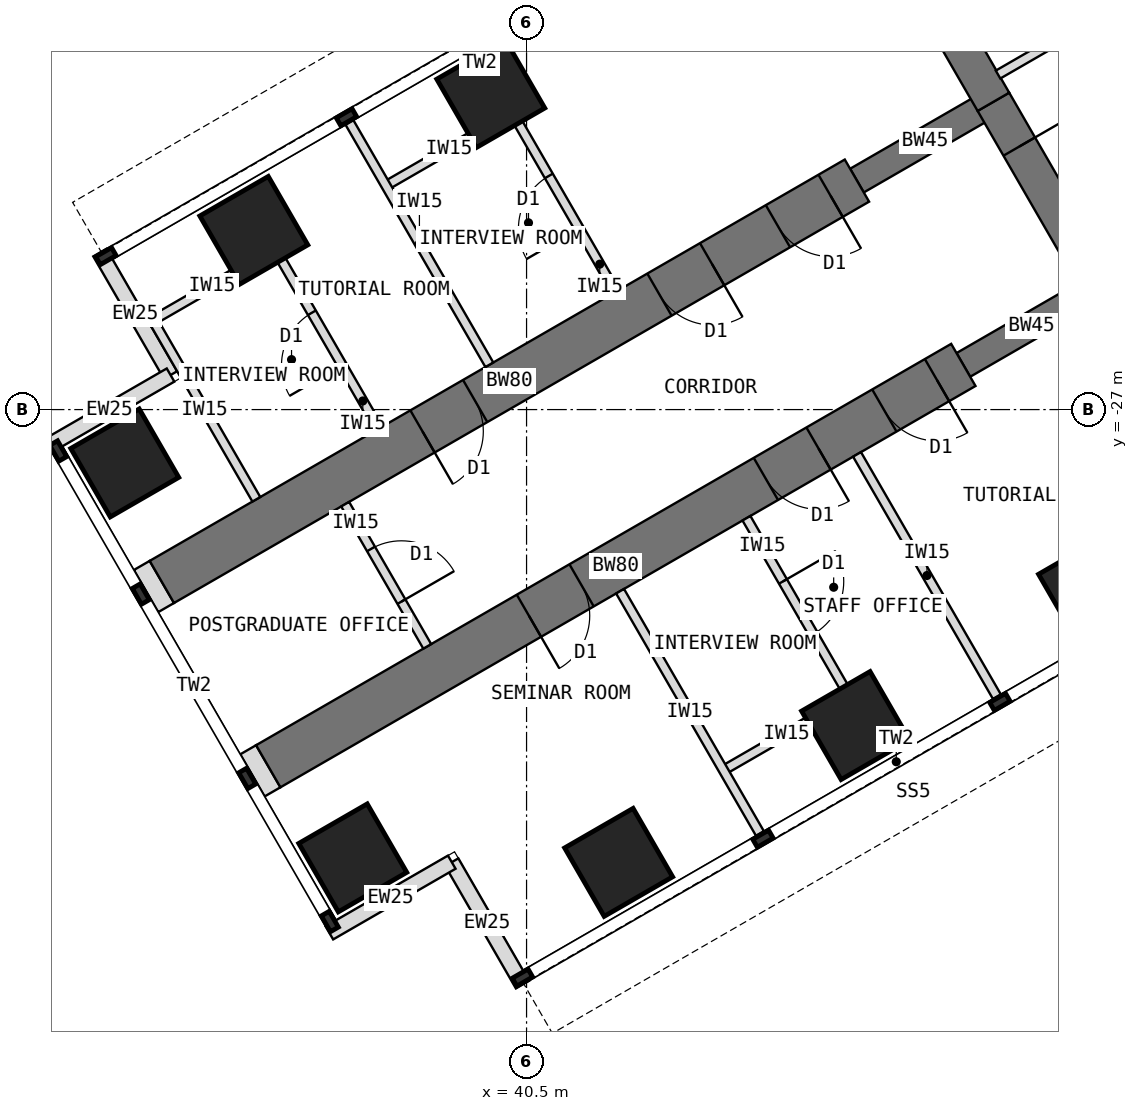
"""IFC4 building model, lengths in metres.
Left out: names, types, materials, properties, quantities, classifications, styles, units other than length and angle.
Written with IfcOpenShell. Run it as: python <this file> out.ifc"""

import sys

from ifc_helpers import new_model, si_unit, direction, frame, frame_2d, origin, origin_2d, place, context, subcontext, project, spatial, rectangle, extrude, element, fill, save


model = new_model("IFC4")
c1 = context("Model", 3, precision=1e-05, world=origin(), true_north=direction((0.0, 1.0)))
c2 = subcontext(c1, "Body", "Model", "MODEL_VIEW")
j1 = project(units=[si_unit("LENGTHUNIT", "METRE"), si_unit("PLANEANGLEUNIT", "RADIAN")], contexts=[c1])
p1 = place(None, origin())
s1 = spatial("IfcSite", under=j1, at=p1, CompositionType="ELEMENT")
p2 = place(p1, origin())
s2 = spatial("IfcBuilding", under=s1, at=p2, CompositionType="ELEMENT")
p3 = place(p2, frame((0.0, 0.0, 133.5)))
s3 = spatial("IfcBuildingStorey", under=s2, at=p3, CompositionType="ELEMENT", Elevation=133.5)
p4 = place(p3, frame((45.904, -18.0, 0.0), z_axis=(0.0, 0.0, 1.0), x_axis=(0.500024481964, -0.866011268655, 0.0)))
e1 = element("IfcWall", 1, at=p4, inside=s3, PredefinedType="SHEAR", context=c2, shape_type="SweptSolid", body=[
    extrude(rectangle(XDim=4.548, YDim=0.6, at=frame_2d((2.274, 0.0))), origin(), (0.0, 0.0, 1.0), 4.0),
])
p5 = place(p3, frame((48.178, -21.939, 0.0), z_axis=(0.0, 0.0, 1.0), x_axis=(0.500010275428, -0.866019471182, 0.0)))
e2 = element("IfcWall", 2, at=p5, inside=s3, PredefinedType="SHEAR", context=c2, shape_type="SweptSolid", body=[
    extrude(rectangle(XDim=3.5, YDim=0.6, at=frame_2d((1.75, 0.0))), origin(), (0.0, 0.0, 1.0), 4.0),
])
p6 = place(p5, frame((0.85, 0.0, 0.0)))
e3 = element("IfcOpeningElement", 3, at=p6, cuts=e2, PredefinedType="OPENING", context=c2, shape_type="SweptSolid", body=[
    extrude(rectangle(XDim=1.8, YDim=2.1, at=frame_2d((0.9, 1.05))), frame((0.0, 0.31, 0.0), z_axis=(0.0, -1.0, 0.0), x_axis=(1.0, 0.0, 0.0)), (0.0, 0.0, 1.0), 0.62),
])
p7 = place(p3, frame((49.928, -24.97, 0.0), z_axis=(0.0, 0.0, 1.0), x_axis=(-0.866031863473, -0.499988811324, 0.0)))
e4 = element("IfcWall", 4, at=p7, inside=s3, PredefinedType="SHEAR", context=c2, shape_type="SweptSolid", body=[
    extrude(rectangle(XDim=2.592, YDim=0.45, at=frame_2d((1.296, 0.0))), origin(), (0.0, 0.0, 1.0), 4.0),
])
p8 = place(p3, frame((47.684, -26.266, 0.0), z_axis=(0.0, 0.0, 1.0), x_axis=(-0.866027579429, -0.499996231654, 0.0)))
e5 = element("IfcWall", 5, at=p8, inside=s3, PredefinedType="SHEAR", context=c2, shape_type="SweptSolid", body=[
    extrude(rectangle(XDim=13.2, YDim=0.8, at=frame_2d((6.6, 0.0))), origin(), (0.0, 0.0, 1.0), 4.0),
])
p9 = place(p8, frame((0.5, 0.0, 0.0)))
e6 = element("IfcOpeningElement", 6, at=p9, cuts=e5, PredefinedType="OPENING", context=c2, shape_type="SweptSolid", body=[
    extrude(rectangle(XDim=1.0, YDim=2.1, at=frame_2d((0.5, 1.05))), frame((0.0, 0.41, 0.0), z_axis=(0.0, -1.0, 0.0), x_axis=(1.0, 0.0, 0.0)), (0.0, 0.0, 1.0), 0.82),
])
p10 = place(p8, frame((2.75, 0.0, 0.0)))
e7 = element("IfcOpeningElement", 7, at=p10, cuts=e5, PredefinedType="OPENING", context=c2, shape_type="SweptSolid", body=[
    extrude(rectangle(XDim=1.0, YDim=2.1, at=frame_2d((0.5, 1.05))), frame((0.0, 0.41, 0.0), z_axis=(0.0, -1.0, 0.0), x_axis=(1.0, 0.0, 0.0)), (0.0, 0.0, 1.0), 0.82),
])
p11 = place(p8, frame((7.25, 0.0, 0.0)))
e8 = element("IfcOpeningElement", 8, at=p11, cuts=e5, PredefinedType="OPENING", context=c2, shape_type="SweptSolid", body=[
    extrude(rectangle(XDim=1.0, YDim=2.1, at=frame_2d((0.5, 1.05))), frame((0.0, 0.41, 0.0), z_axis=(0.0, -1.0, 0.0), x_axis=(1.0, 0.0, 0.0)), (0.0, 0.0, 1.0), 0.82),
])
p12 = place(p3, frame((48.178, -21.939, 0.0), z_axis=(0.0, 0.0, 1.0), x_axis=(-0.866072649678, -0.499918158782, 0.0)))
e9 = element("IfcWall", 9, at=p12, inside=s3, PredefinedType="SHEAR", context=c2, shape_type="SweptSolid", body=[
    extrude(rectangle(XDim=2.592, YDim=0.45, at=frame_2d((1.296, 0.0))), origin(), (0.0, 0.0, 1.0), 4.0),
])
p13 = place(p3, frame((45.934, -23.234, 0.0), z_axis=(0.0, 0.0, 1.0), x_axis=(-0.866019570528, -0.500010103361, 0.0)))
e10 = element("IfcWall", 10, at=p13, inside=s3, PredefinedType="SHEAR", context=c2, shape_type="SweptSolid", body=[
    extrude(rectangle(XDim=13.2, YDim=0.8, at=frame_2d((6.6, 0.0))), origin(), (0.0, 0.0, 1.0), 4.0),
])
p14 = place(p13, frame((0.5, 0.0, 0.0)))
e11 = element("IfcOpeningElement", 11, at=p14, cuts=e10, PredefinedType="OPENING", context=c2, shape_type="SweptSolid", body=[
    extrude(rectangle(XDim=1.0, YDim=2.1, at=frame_2d((0.5, 1.05))), frame((0.0, 0.41, 0.0), z_axis=(0.0, -1.0, 0.0), x_axis=(1.0, 0.0, 0.0)), (0.0, 0.0, 1.0), 0.82),
])
p15 = place(p13, frame((2.75, 0.0, 0.0)))
e12 = element("IfcOpeningElement", 12, at=p15, cuts=e10, PredefinedType="OPENING", context=c2, shape_type="SweptSolid", body=[
    extrude(rectangle(XDim=1.0, YDim=2.1, at=frame_2d((0.5, 1.05))), frame((0.0, 0.41, 0.0), z_axis=(0.0, -1.0, 0.0), x_axis=(1.0, 0.0, 0.0)), (0.0, 0.0, 1.0), 0.82),
])
p16 = place(p13, frame((7.25, 0.0, 0.0)))
e13 = element("IfcOpeningElement", 13, at=p16, cuts=e10, PredefinedType="OPENING", context=c2, shape_type="SweptSolid", body=[
    extrude(rectangle(XDim=1.0, YDim=2.1, at=frame_2d((0.5, 1.05))), frame((0.0, 0.41, 0.0), z_axis=(0.0, -1.0, 0.0), x_axis=(1.0, 0.0, 0.0)), (0.0, 0.0, 1.0), 0.82),
])
for number, where, z_axis, x_axis in (
    (14, (49.809, -29.946, 0.0), (0.0, 0.0, 1.0), (0.866, 0.5, 0.0)),
    (15, (45.912, -32.196, 0.0), (0.0, 0.0, 1.0), (0.866, 0.5, 0.0)),
    (16, (39.912, -21.804, 0.0), (0.0, 0.0, 1.0), (0.866, 0.5, 0.0)),
    (17, (42.014, -34.446, 0.0), (0.0, 0.0, 1.0), (0.866, 0.5, 0.0)),
    (18, (36.014, -24.054, 0.0), (0.0, 0.0, 1.0), (0.866, 0.5, 0.0)),
    (19, (37.642, -34.373, 0.0), (0.0, 0.0, 1.0), (0.866, 0.5, 0.0)),
    (20, (33.892, -27.877, 0.0), (0.0, 0.0, 1.0), (0.866, 0.5, 0.0)),
):
    element("IfcColumn", number, at=place(p3, frame(where, z_axis=z_axis, x_axis=x_axis)), inside=s3, PredefinedType="COLUMN", context=c2, shape_type="SweptSolid", body=[
        extrude(rectangle(XDim=1.3, YDim=1.3, at=origin_2d()), origin(), (0.0, 0.0, 1.0), 4.0),
    ])
for number, where, z_axis, x_axis in (
    (21, (40.433, -36.456, 0.0), (0.0, 0.0, 1.0), (-0.5, 0.866, 0.0)),
    (22, (39.27, -34.443, 0.0), (0.0, 0.0, 1.0), (-0.866, -0.5, 0.0)),
    (23, (33.483, -24.419, 0.0), (0.0, 0.0, 1.0), (0.5, -0.866, 0.0)),
    (24, (34.645, -26.432, 0.0), (0.0, 0.0, 1.0), (-0.866, -0.5, 0.0)),
):
    element("IfcWall", number, at=place(p3, frame(where, z_axis=z_axis, x_axis=x_axis)), inside=s3, PredefinedType="STANDARD", context=c2, shape_type="SweptSolid", body=[
        extrude(rectangle(XDim=2.325, YDim=0.25, at=frame_2d((1.163, 0.0))), origin(), (0.0, 0.0, 1.0), 3.8),
    ])
p17 = place(p3, frame((36.252, -32.865, 0.0), z_axis=(0.0, 0.0, 1.0), x_axis=(-0.865778900179, -0.500426713919, 0.0)))
e25 = element("IfcWall", 25, at=p17, inside=s3, PredefinedType="PARTITIONING", context=c2, shape_type="SweptSolid", body=[
    extrude(rectangle(XDim=0.3, YDim=0.8, at=frame_2d((0.15, 0.0))), origin(), (0.0, 0.0, 1.0), 3.8),
])
p18 = place(p3, frame((34.502, -29.834, 0.0), z_axis=(0.0, 0.0, 1.0), x_axis=(-0.866131372301, -0.499816412211, 0.0)))
e26 = element("IfcWall", 26, at=p18, inside=s3, PredefinedType="PARTITIONING", context=c2, shape_type="SweptSolid", body=[
    extrude(rectangle(XDim=0.3, YDim=0.8, at=frame_2d((0.15, 0.0))), origin(), (0.0, 0.0, 1.0), 3.8),
])
for number, where, z_axis, x_axis in (
    (27, (45.935, -27.737, 0.0), (0.0, 0.0, 1.0), (0.5, -0.866, 0.0)),
    (28, (42.038, -29.987, 0.0), (0.0, 0.0, 1.0), (0.5, -0.866, 0.0)),
):
    element("IfcWall", number, at=place(p3, frame(where, z_axis=z_axis, x_axis=x_axis)), inside=s3, PredefinedType="PARTITIONING", context=c2, shape_type="SweptSolid", body=[
        extrude(rectangle(XDim=4.6, YDim=0.15, at=frame_2d((2.3, 0.0))), origin(), (0.0, 0.0, 1.0), 3.8),
    ])
p19 = place(p3, frame((45.816, -31.731, 0.0), z_axis=(0.0, 0.0, 1.0), x_axis=(-0.866024647952, -0.500001309137, 0.0)))
e29 = element("IfcWall", 29, at=p19, inside=s3, PredefinedType="PARTITIONING", context=c2, shape_type="SweptSolid", body=[
    extrude(rectangle(XDim=2.4, YDim=0.15, at=frame_2d((1.2, 0.0))), origin(), (0.0, 0.0, 1.0), 3.8),
])
p20 = place(p3, frame((44.116, -28.787, 0.0), z_axis=(0.0, 0.0, 1.0), x_axis=(0.499977295307, -0.866038511948, 0.0)))
e30 = element("IfcWall", 30, at=p20, inside=s3, PredefinedType="PARTITIONING", context=c2, shape_type="SweptSolid", body=[
    extrude(rectangle(XDim=3.4, YDim=0.15, at=frame_2d((1.7, 0.0))), origin(), (0.0, 0.0, 1.0), 3.8),
])
p21 = place(p20, frame((1.2, 0.0, 0.0)))
e31 = element("IfcOpeningElement", 31, at=p21, cuts=e30, PredefinedType="OPENING", context=c2, shape_type="SweptSolid", body=[
    extrude(rectangle(XDim=1.0, YDim=2.1, at=frame_2d((0.5, 1.05))), frame((0.0, 0.085, 0.0), z_axis=(0.0, -1.0, 0.0), x_axis=(1.0, 0.0, 0.0)), (0.0, 0.0, 1.0), 0.17),
])
p22 = place(p3, frame((39.888, -26.263, 0.0), z_axis=(0.0, 0.0, 1.0), x_axis=(-0.500014953309, 0.866016770315, 0.0)))
e32 = element("IfcWall", 32, at=p22, inside=s3, PredefinedType="PARTITIONING", context=c2, shape_type="SweptSolid", body=[
    extrude(rectangle(XDim=4.6, YDim=0.15, at=frame_2d((2.3, 0.0))), origin(), (0.0, 0.0, 1.0), 3.8),
])
p23 = place(p3, frame((40.266, -22.119, 0.0), z_axis=(0.0, 0.0, 1.0), x_axis=(-0.866024647952, -0.500001309137, 0.0)))
e33 = element("IfcWall", 33, at=p23, inside=s3, PredefinedType="PARTITIONING", context=c2, shape_type="SweptSolid", body=[
    extrude(rectangle(XDim=2.4, YDim=0.15, at=frame_2d((1.2, 0.0))), origin(), (0.0, 0.0, 1.0), 3.8),
])
p24 = place(p3, frame((41.967, -25.063, 0.0), z_axis=(0.0, 0.0, 1.0), x_axis=(-0.500062241894, 0.865989465428, 0.0)))
e34 = element("IfcWall", 34, at=p24, inside=s3, PredefinedType="PARTITIONING", context=c2, shape_type="SweptSolid", body=[
    extrude(rectangle(XDim=3.4, YDim=0.15, at=frame_2d((1.7, 0.0))), origin(), (0.0, 0.0, 1.0), 3.8),
])
p25 = place(p24, frame((1.2, 0.0, 0.0)))
e35 = element("IfcOpeningElement", 35, at=p25, cuts=e34, PredefinedType="OPENING", context=c2, shape_type="SweptSolid", body=[
    extrude(rectangle(XDim=1.0, YDim=2.1, at=frame_2d((0.5, 1.05))), frame((0.0, 0.085, 0.0), z_axis=(0.0, -1.0, 0.0), x_axis=(1.0, 0.0, 0.0)), (0.0, 0.0, 1.0), 0.17),
])
p26 = place(p3, frame((36.369, -24.369, 0.0), z_axis=(0.0, 0.0, 1.0), x_axis=(-0.866050077142, -0.499957262057, 0.0)))
e36 = element("IfcWall", 36, at=p26, inside=s3, PredefinedType="PARTITIONING", context=c2, shape_type="SweptSolid", body=[
    extrude(rectangle(XDim=2.4, YDim=0.15, at=frame_2d((1.2, 0.0))), origin(), (0.0, 0.0, 1.0), 3.8),
])
p27 = place(p3, frame((38.069, -27.313, 0.0), z_axis=(0.0, 0.0, 1.0), x_axis=(-0.500008388397, 0.866020560687, 0.0)))
e37 = element("IfcWall", 37, at=p27, inside=s3, PredefinedType="PARTITIONING", context=c2, shape_type="SweptSolid", body=[
    extrude(rectangle(XDim=3.4, YDim=0.15, at=frame_2d((1.7, 0.0))), origin(), (0.0, 0.0, 1.0), 3.8),
])
p28 = place(p27, frame((1.2, 0.0, 0.0)))
e38 = element("IfcOpeningElement", 38, at=p28, cuts=e37, PredefinedType="OPENING", context=c2, shape_type="SweptSolid", body=[
    extrude(rectangle(XDim=1.0, YDim=2.1, at=frame_2d((0.5, 1.05))), frame((0.0, 0.085, 0.0), z_axis=(0.0, -1.0, 0.0), x_axis=(1.0, 0.0, 0.0)), (0.0, 0.0, 1.0), 0.17),
])
p29 = place(p3, frame((36.056, -28.476, 0.0), z_axis=(0.0, 0.0, 1.0), x_axis=(-0.500031147688, 0.866007419912, 0.0)))
e39 = element("IfcWall", 39, at=p29, inside=s3, PredefinedType="PARTITIONING", context=c2, shape_type="SweptSolid", body=[
    extrude(rectangle(XDim=3.4, YDim=0.15, at=frame_2d((1.7, 0.0))), origin(), (0.0, 0.0, 1.0), 3.8),
])
p30 = place(p3, frame((48.254, -21.49, 0.0), z_axis=(0.0, 0.0, 1.0), x_axis=(0.866025707867, 0.499999473313, 0.0)))
e40 = element("IfcWall", 40, at=p30, inside=s3, PredefinedType="PARTITIONING", context=c2, shape_type="SweptSolid", body=[
    extrude(rectangle(XDim=4.476, YDim=0.15, at=frame_2d((2.238, 0.0))), origin(), (0.0, 0.0, 1.0), 3.8),
])
p31 = place(p30, frame((2.633, 0.0, 0.0)))
e41 = element("IfcOpeningElement", 41, at=p31, cuts=e40, PredefinedType="OPENING", context=c2, shape_type="SweptSolid", body=[
    extrude(rectangle(XDim=1.0, YDim=2.1, at=frame_2d((0.5, 1.05))), frame((0.0, 0.085, 0.0), z_axis=(0.0, -1.0, 0.0), x_axis=(1.0, 0.0, 0.0)), (0.0, 0.0, 1.0), 0.17),
])
p32 = place(p3, frame((37.517, -28.556, 0.0), z_axis=(0.0, 0.0, 1.0), x_axis=(0.500048589285, -0.86599734893, 0.0)))
e42 = element("IfcWall", 42, at=p32, inside=s3, PredefinedType="PARTITIONING", context=c2, shape_type="SweptSolid", body=[
    extrude(rectangle(XDim=2.7, YDim=0.15, at=frame_2d((1.35, 0.0))), origin(), (0.0, 0.0, 1.0), 3.8),
])
p33 = place(p32, frame((0.85, 0.0, 0.0)))
e43 = element("IfcOpeningElement", 43, at=p33, cuts=e42, PredefinedType="OPENING", context=c2, shape_type="SweptSolid", body=[
    extrude(rectangle(XDim=1.0, YDim=2.1, at=frame_2d((0.5, 1.05))), frame((0.0, 0.085, 0.0), z_axis=(0.0, -1.0, 0.0), x_axis=(1.0, 0.0, 0.0)), (0.0, 0.0, 1.0), 0.17),
])
p34 = place(p6, origin())
e44 = element("IfcDoor", 44, at=p34, inside=s3, OperationType="DOUBLE_DOOR_DOUBLE_SWING", PredefinedType="DOOR", context=c2, shape_type="SweptSolid", body=[
    extrude(rectangle(XDim=1.72, YDim=2.06, at=frame_2d((0.9, 1.03))), frame((0.0, 0.025, 0.0), z_axis=(0.0, -1.0, 0.0), x_axis=(1.0, 0.0, 0.0)), (0.0, 0.0, 1.0), 0.05),
    extrude(rectangle(XDim=0.04, YDim=2.1, at=frame_2d((0.02, 1.05))), frame((0.0, 0.3, 0.0), z_axis=(0.0, -1.0, 0.0), x_axis=(1.0, 0.0, 0.0)), (0.0, 0.0, 1.0), 0.6),
    extrude(rectangle(XDim=0.04, YDim=2.1, at=frame_2d((1.78, 1.05))), frame((0.0, 0.3, 0.0), z_axis=(0.0, -1.0, 0.0), x_axis=(1.0, 0.0, 0.0)), (0.0, 0.0, 1.0), 0.6),
    extrude(rectangle(XDim=1.72, YDim=0.04, at=frame_2d((0.9, 2.08))), frame((0.0, 0.3, 0.0), z_axis=(0.0, -1.0, 0.0), x_axis=(1.0, 0.0, 0.0)), (0.0, 0.0, 1.0), 0.6),
])
fill(e3, e44)
p35 = place(p21, origin())
e45 = element("IfcDoor", 45, at=p35, inside=s3, OperationType="SINGLE_SWING_LEFT", PredefinedType="DOOR", context=c2, shape_type="SweptSolid", body=[
    extrude(rectangle(XDim=1.0, YDim=2.1, at=frame_2d((0.5, 1.05))), frame((0.0, 0.025, 0.0), z_axis=(0.0, -1.0, 0.0), x_axis=(1.0, 0.0, 0.0)), (0.0, 0.0, 1.0), 0.05),
])
fill(e31, e45)
p36 = place(p25, origin())
e46 = element("IfcDoor", 46, at=p36, inside=s3, OperationType="SINGLE_SWING_LEFT", PredefinedType="DOOR", context=c2, shape_type="SweptSolid", body=[
    extrude(rectangle(XDim=1.0, YDim=2.1, at=frame_2d((0.5, 1.05))), frame((0.0, 0.025, 0.0), z_axis=(0.0, -1.0, 0.0), x_axis=(1.0, 0.0, 0.0)), (0.0, 0.0, 1.0), 0.05),
])
fill(e35, e46)
p37 = place(p28, origin())
e47 = element("IfcDoor", 47, at=p37, inside=s3, OperationType="SINGLE_SWING_LEFT", PredefinedType="DOOR", context=c2, shape_type="SweptSolid", body=[
    extrude(rectangle(XDim=1.0, YDim=2.1, at=frame_2d((0.5, 1.05))), frame((0.0, 0.025, 0.0), z_axis=(0.0, -1.0, 0.0), x_axis=(1.0, 0.0, 0.0)), (0.0, 0.0, 1.0), 0.05),
])
fill(e38, e47)
p38 = place(p33, origin())
e48 = element("IfcDoor", 48, at=p38, inside=s3, OperationType="SINGLE_SWING_RIGHT", PredefinedType="DOOR", context=c2, shape_type="SweptSolid", body=[
    extrude(rectangle(XDim=1.0, YDim=2.1, at=frame_2d((0.5, 1.05))), frame((0.0, 0.025, 0.0), z_axis=(0.0, -1.0, 0.0), x_axis=(1.0, 0.0, 0.0)), (0.0, 0.0, 1.0), 0.05),
])
fill(e43, e48)
p39 = place(p9, origin())
e49 = element("IfcDoor", 49, at=p39, inside=s3, OperationType="SINGLE_SWING_LEFT", PredefinedType="DOOR", context=c2, shape_type="SweptSolid", body=[
    extrude(rectangle(XDim=0.92, YDim=2.06, at=frame_2d((0.5, 1.03))), frame((0.0, 0.025, 0.0), z_axis=(0.0, -1.0, 0.0), x_axis=(1.0, 0.0, 0.0)), (0.0, 0.0, 1.0), 0.05),
    extrude(rectangle(XDim=0.04, YDim=2.1, at=frame_2d((0.02, 1.05))), frame((0.0, 0.4, 0.0), z_axis=(0.0, -1.0, 0.0), x_axis=(1.0, 0.0, 0.0)), (0.0, 0.0, 1.0), 0.8),
    extrude(rectangle(XDim=0.04, YDim=2.1, at=frame_2d((0.98, 1.05))), frame((0.0, 0.4, 0.0), z_axis=(0.0, -1.0, 0.0), x_axis=(1.0, 0.0, 0.0)), (0.0, 0.0, 1.0), 0.8),
    extrude(rectangle(XDim=0.92, YDim=0.04, at=frame_2d((0.5, 2.08))), frame((0.0, 0.4, 0.0), z_axis=(0.0, -1.0, 0.0), x_axis=(1.0, 0.0, 0.0)), (0.0, 0.0, 1.0), 0.8),
])
fill(e6, e49)
p40 = place(p10, origin())
e50 = element("IfcDoor", 50, at=p40, inside=s3, OperationType="SINGLE_SWING_LEFT", PredefinedType="DOOR", context=c2, shape_type="SweptSolid", body=[
    extrude(rectangle(XDim=0.92, YDim=2.06, at=frame_2d((0.5, 1.03))), frame((0.0, 0.025, 0.0), z_axis=(0.0, -1.0, 0.0), x_axis=(1.0, 0.0, 0.0)), (0.0, 0.0, 1.0), 0.05),
    extrude(rectangle(XDim=0.04, YDim=2.1, at=frame_2d((0.02, 1.05))), frame((0.0, 0.4, 0.0), z_axis=(0.0, -1.0, 0.0), x_axis=(1.0, 0.0, 0.0)), (0.0, 0.0, 1.0), 0.8),
    extrude(rectangle(XDim=0.04, YDim=2.1, at=frame_2d((0.98, 1.05))), frame((0.0, 0.4, 0.0), z_axis=(0.0, -1.0, 0.0), x_axis=(1.0, 0.0, 0.0)), (0.0, 0.0, 1.0), 0.8),
    extrude(rectangle(XDim=0.92, YDim=0.04, at=frame_2d((0.5, 2.08))), frame((0.0, 0.4, 0.0), z_axis=(0.0, -1.0, 0.0), x_axis=(1.0, 0.0, 0.0)), (0.0, 0.0, 1.0), 0.8),
])
fill(e7, e50)
p41 = place(p11, origin())
e51 = element("IfcDoor", 51, at=p41, inside=s3, OperationType="SINGLE_SWING_RIGHT", PredefinedType="DOOR", context=c2, shape_type="SweptSolid", body=[
    extrude(rectangle(XDim=0.92, YDim=2.06, at=frame_2d((0.5, 1.03))), frame((0.0, 0.025, 0.0), z_axis=(0.0, -1.0, 0.0), x_axis=(1.0, 0.0, 0.0)), (0.0, 0.0, 1.0), 0.05),
    extrude(rectangle(XDim=0.04, YDim=2.1, at=frame_2d((0.02, 1.05))), frame((0.0, 0.4, 0.0), z_axis=(0.0, -1.0, 0.0), x_axis=(1.0, 0.0, 0.0)), (0.0, 0.0, 1.0), 0.8),
    extrude(rectangle(XDim=0.04, YDim=2.1, at=frame_2d((0.98, 1.05))), frame((0.0, 0.4, 0.0), z_axis=(0.0, -1.0, 0.0), x_axis=(1.0, 0.0, 0.0)), (0.0, 0.0, 1.0), 0.8),
    extrude(rectangle(XDim=0.92, YDim=0.04, at=frame_2d((0.5, 2.08))), frame((0.0, 0.4, 0.0), z_axis=(0.0, -1.0, 0.0), x_axis=(1.0, 0.0, 0.0)), (0.0, 0.0, 1.0), 0.8),
])
fill(e8, e51)
p42 = place(p14, origin())
e52 = element("IfcDoor", 52, at=p42, inside=s3, OperationType="SINGLE_SWING_LEFT", PredefinedType="DOOR", context=c2, shape_type="SweptSolid", body=[
    extrude(rectangle(XDim=0.92, YDim=2.06, at=frame_2d((0.5, 1.03))), frame((0.0, 0.025, 0.0), z_axis=(0.0, -1.0, 0.0), x_axis=(1.0, 0.0, 0.0)), (0.0, 0.0, 1.0), 0.05),
    extrude(rectangle(XDim=0.04, YDim=2.1, at=frame_2d((0.02, 1.05))), frame((0.0, 0.4, 0.0), z_axis=(0.0, -1.0, 0.0), x_axis=(1.0, 0.0, 0.0)), (0.0, 0.0, 1.0), 0.8),
    extrude(rectangle(XDim=0.04, YDim=2.1, at=frame_2d((0.98, 1.05))), frame((0.0, 0.4, 0.0), z_axis=(0.0, -1.0, 0.0), x_axis=(1.0, 0.0, 0.0)), (0.0, 0.0, 1.0), 0.8),
    extrude(rectangle(XDim=0.92, YDim=0.04, at=frame_2d((0.5, 2.08))), frame((0.0, 0.4, 0.0), z_axis=(0.0, -1.0, 0.0), x_axis=(1.0, 0.0, 0.0)), (0.0, 0.0, 1.0), 0.8),
])
fill(e11, e52)
p43 = place(p15, origin())
e53 = element("IfcDoor", 53, at=p43, inside=s3, OperationType="SINGLE_SWING_LEFT", PredefinedType="DOOR", context=c2, shape_type="SweptSolid", body=[
    extrude(rectangle(XDim=0.92, YDim=2.06, at=frame_2d((0.5, 1.03))), frame((0.0, 0.025, 0.0), z_axis=(0.0, -1.0, 0.0), x_axis=(1.0, 0.0, 0.0)), (0.0, 0.0, 1.0), 0.05),
    extrude(rectangle(XDim=0.04, YDim=2.1, at=frame_2d((0.02, 1.05))), frame((0.0, 0.4, 0.0), z_axis=(0.0, -1.0, 0.0), x_axis=(1.0, 0.0, 0.0)), (0.0, 0.0, 1.0), 0.8),
    extrude(rectangle(XDim=0.04, YDim=2.1, at=frame_2d((0.98, 1.05))), frame((0.0, 0.4, 0.0), z_axis=(0.0, -1.0, 0.0), x_axis=(1.0, 0.0, 0.0)), (0.0, 0.0, 1.0), 0.8),
    extrude(rectangle(XDim=0.92, YDim=0.04, at=frame_2d((0.5, 2.08))), frame((0.0, 0.4, 0.0), z_axis=(0.0, -1.0, 0.0), x_axis=(1.0, 0.0, 0.0)), (0.0, 0.0, 1.0), 0.8),
])
fill(e12, e53)
p44 = place(p16, origin())
e54 = element("IfcDoor", 54, at=p44, inside=s3, OperationType="SINGLE_SWING_RIGHT", PredefinedType="DOOR", context=c2, shape_type="SweptSolid", body=[
    extrude(rectangle(XDim=0.92, YDim=2.06, at=frame_2d((0.5, 1.03))), frame((0.0, 0.025, 0.0), z_axis=(0.0, -1.0, 0.0), x_axis=(1.0, 0.0, 0.0)), (0.0, 0.0, 1.0), 0.05),
    extrude(rectangle(XDim=0.04, YDim=2.1, at=frame_2d((0.02, 1.05))), frame((0.0, 0.4, 0.0), z_axis=(0.0, -1.0, 0.0), x_axis=(1.0, 0.0, 0.0)), (0.0, 0.0, 1.0), 0.8),
    extrude(rectangle(XDim=0.04, YDim=2.1, at=frame_2d((0.98, 1.05))), frame((0.0, 0.4, 0.0), z_axis=(0.0, -1.0, 0.0), x_axis=(1.0, 0.0, 0.0)), (0.0, 0.0, 1.0), 0.8),
    extrude(rectangle(XDim=0.92, YDim=0.04, at=frame_2d((0.5, 2.08))), frame((0.0, 0.4, 0.0), z_axis=(0.0, -1.0, 0.0), x_axis=(1.0, 0.0, 0.0)), (0.0, 0.0, 1.0), 0.8),
])
fill(e13, e54)
save(model, sys.argv[1])
